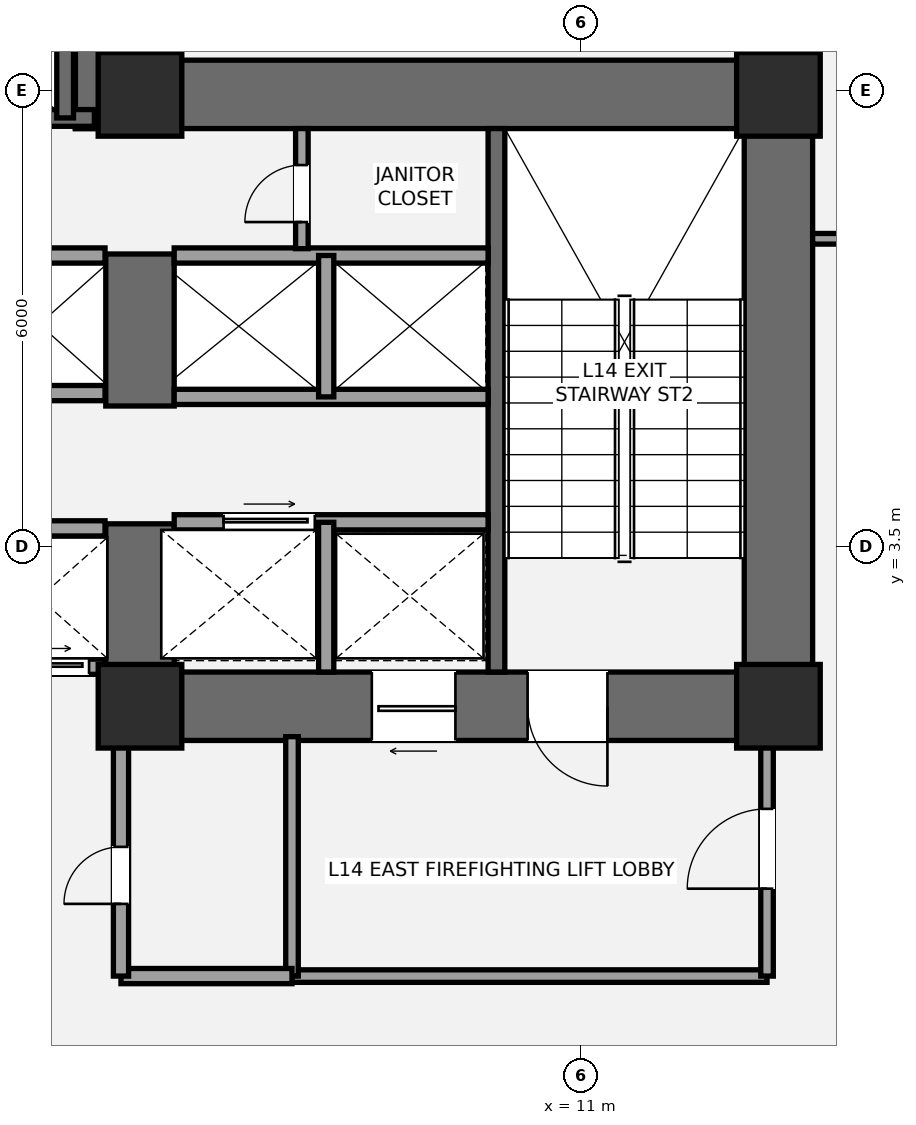
"""IFC4 building model, lengths in metres.
Left out: names, types, materials, properties, quantities, classifications, styles, units other than length and angle.
Written with IfcOpenShell. Run it as: python <this file> out.ifc"""

import sys

from ifc_helpers import new_model, si_unit, direction, frame, frame_2d, origin, origin_2d, place, context, subcontext, project, spatial, rectangle, extrude, element, fill, save


model = new_model("IFC4")
c1 = context("Model", 3, precision=1e-05, world=origin(), true_north=direction((0.0, 1.0)))
c2 = subcontext(c1, "Body", "Model", "MODEL_VIEW")
j1 = project(units=[si_unit("LENGTHUNIT", "METRE"), si_unit("PLANEANGLEUNIT", "RADIAN")], contexts=[c1])
p1 = place(None, origin())
s1 = spatial("IfcSite", under=j1, at=p1, CompositionType="ELEMENT")
p2 = place(p1, origin())
s2 = spatial("IfcBuilding", under=s1, at=p2, CompositionType="ELEMENT")
p3 = place(p2, frame((0.0, 0.0, 55.8)))
s3 = spatial("IfcBuildingStorey", under=s2, at=p3, CompositionType="ELEMENT", Elevation=55.8)
p4 = place(p3, frame((13.6, 0.95, 0.0), z_axis=(0.0, 0.0, 1.0), x_axis=(0.0, 1.0, 0.0)))
e1 = element("IfcWall", 1, at=p4, inside=s3, PredefinedType="SHEAR", context=c2, shape_type="SweptSolid", body=[
    extrude(rectangle(XDim=8.95, YDim=0.9, at=frame_2d((4.475, 0.0))), origin(), (0.0, 0.0, 1.0), 3.6),
])
p5 = place(p3, frame((4.35, 9.45, 0.0), z_axis=(0.0, 0.0, 1.0), x_axis=(1.0, 0.0, 0.0)))
e2 = element("IfcWall", 2, at=p5, inside=s3, PredefinedType="SHEAR", context=c2, shape_type="SweptSolid", body=[
    extrude(rectangle(XDim=9.7, YDim=0.9, at=frame_2d((4.85, 0.0))), origin(), (0.0, 0.0, 1.0), 3.6),
])
p6 = place(p3, frame((14.05, 1.4, 0.0), z_axis=(0.0, 0.0, 1.0), x_axis=(-1.0, 0.0, 0.0)))
e3 = element("IfcWall", 3, at=p6, inside=s3, PredefinedType="SHEAR", context=c2, shape_type="SweptSolid", body=[
    extrude(rectangle(XDim=9.3, YDim=0.9, at=frame_2d((4.65, 0.0))), origin(), (0.0, 0.0, 1.0), 3.6),
])
p7 = place(p6, frame((2.7, 0.0, 0.0)))
e4 = element("IfcOpeningElement", 4, at=p7, cuts=e3, PredefinedType="OPENING", context=c2, shape_type="SweptSolid", body=[
    extrude(rectangle(XDim=1.05, YDim=2.15, at=frame_2d((0.525, 1.075))), frame((0.0, 0.46, 0.0), z_axis=(0.0, -1.0, 0.0), x_axis=(1.0, 0.0, 0.0)), (0.0, 0.0, 1.0), 0.92),
])
p8 = place(p6, frame((4.7, 0.0, 0.0)))
e5 = element("IfcOpeningElement", 5, at=p8, cuts=e3, PredefinedType="OPENING", context=c2, shape_type="SweptSolid", body=[
    extrude(rectangle(XDim=1.1, YDim=2.2, at=frame_2d((0.55, 1.1))), frame((0.0, 0.46, 0.0), z_axis=(0.0, -1.0, 0.0), x_axis=(1.0, 0.0, 0.0)), (0.0, 0.0, 1.0), 0.92),
])
p9 = place(p3, frame((5.2, 0.95, 0.0), z_axis=(0.0, 0.0, 1.0), x_axis=(0.0, 1.0, 0.0)))
e6 = element("IfcWall", 6, at=p9, inside=s3, PredefinedType="SHEAR", context=c2, shape_type="SweptSolid", body=[
    extrude(rectangle(XDim=2.85, YDim=0.9, at=frame_2d((1.425, 0.0))), origin(), (0.0, 0.0, 1.0), 3.6),
])
p10 = place(p3, frame((5.2, 5.35, 0.0), z_axis=(0.0, 0.0, 1.0), x_axis=(0.0, 1.0, 0.0)))
e7 = element("IfcWall", 7, at=p10, inside=s3, PredefinedType="SHEAR", context=c2, shape_type="SweptSolid", body=[
    extrude(rectangle(XDim=2.0, YDim=0.9, at=frame_2d((1.0, 0.0))), origin(), (0.0, 0.0, 1.0), 3.6),
])
p11 = place(p3, frame((9.89, 1.85, 0.0), z_axis=(0.0, 0.0, 1.0), x_axis=(0.0, 1.0, 0.0)))
e8 = element("IfcWall", 8, at=p11, inside=s3, PredefinedType="SHEAR", context=c2, shape_type="SweptSolid", body=[
    extrude(rectangle(XDim=7.15, YDim=0.22, at=frame_2d((3.575, 0.0))), origin(), (0.0, 0.0, 1.0), 3.6),
])
p12 = place(p3, frame((4.8, 9.0, 0.0), z_axis=(0.0, 0.0, 1.0), x_axis=(0.0, 1.0, 0.0)))
e9 = element("IfcWall", 9, at=p12, inside=s3, PredefinedType="SHEAR", context=c2, shape_type="SweptSolid", body=[
    extrude(rectangle(XDim=4.3, YDim=0.9, at=frame_2d((2.15, 0.0))), origin(), (0.0, 0.0, 1.0), 3.6),
])
p13 = place(p3, frame((-4.7, 9.14, 0.0), z_axis=(0.0, 0.0, 1.0), x_axis=(1.0, 0.0, 0.0)))
e10 = element("IfcWall", 10, at=p13, inside=s3, PredefinedType="SHEAR", context=c2, shape_type="SweptSolid", body=[
    extrude(rectangle(XDim=9.3, YDim=0.22, at=frame_2d((4.65, 0.0))), origin(), (0.0, 0.0, 1.0), 3.6),
])
p14 = place(p13, frame((1.15, 0.0, 0.0)))
e11 = element("IfcOpeningElement", 11, at=p14, cuts=e10, PredefinedType="OPENING", context=c2, shape_type="SweptSolid", body=[
    extrude(rectangle(XDim=1.05, YDim=2.15, at=frame_2d((0.525, 1.075))), frame((0.0, 0.12, 0.0), z_axis=(0.0, -1.0, 0.0), x_axis=(1.0, 0.0, 0.0)), (0.0, 0.0, 1.0), 0.24),
])
p15 = place(p3, frame((4.215, 9.14, 0.0), z_axis=(0.0, 0.0, 1.0), x_axis=(0.0, 1.0, 0.0)))
e12 = element("IfcWall", 12, at=p15, inside=s3, PredefinedType="SHEAR", context=c2, shape_type="SweptSolid", body=[
    extrude(rectangle(XDim=3.26, YDim=0.22, at=frame_2d((1.63, 0.0))), origin(), (0.0, 0.0, 1.0), 3.6),
])
for number, where, z_axis, x_axis in (
    (13, (5.2, 1.4, 0.0), (0.0, 0.0, 1.0), (1.0, 0.0, 0.0)),
    (14, (5.2, 9.45, 0.0), (0.0, 0.0, 1.0), (1.0, 0.0, 0.0)),
    (15, (13.6, 1.4, 0.0), (0.0, 0.0, 1.0), (1.0, 0.0, 0.0)),
    (16, (13.6, 9.45, 0.0), (0.0, 0.0, 1.0), (1.0, 0.0, 0.0)),
):
    element("IfcColumn", number, at=place(p3, frame(where, z_axis=z_axis, x_axis=x_axis)), inside=s3, PredefinedType="COLUMN", context=c2, shape_type="SweptSolid", body=[
        extrude(rectangle(XDim=1.1, YDim=1.1, at=origin_2d()), origin(), (0.0, 0.0, 1.0), 3.6),
    ])
p16 = place(p3, frame((7.2, -2.15, 0.0), z_axis=(0.0, 0.0, 1.0), x_axis=(1.0, 0.0, 0.0)))
e17 = element("IfcWall", 17, at=p16, inside=s3, PredefinedType="PARTITIONING", context=c2, shape_type="SweptSolid", body=[
    extrude(rectangle(XDim=6.25, YDim=0.165, at=frame_2d((3.125, 0.0))), origin(), (0.0, 0.0, 1.0), 3.4),
])
p17 = place(p3, frame((7.2, -2.15, 0.0), z_axis=(0.0, 0.0, 1.0), x_axis=(0.0, 1.0, 0.0)))
e18 = element("IfcWall", 18, at=p17, inside=s3, PredefinedType="PARTITIONING", context=c2, shape_type="SweptSolid", body=[
    extrude(rectangle(XDim=3.15, YDim=0.165, at=frame_2d((1.575, 0.0))), origin(), (0.0, 0.0, 1.0), 2.853),
])
p18 = place(p3, frame((13.45, -2.15, 0.0), z_axis=(0.0, 0.0, 1.0), x_axis=(0.0, 1.0, 0.0)))
e19 = element("IfcWall", 19, at=p18, inside=s3, PredefinedType="PARTITIONING", context=c2, shape_type="SweptSolid", body=[
    extrude(rectangle(XDim=3.15, YDim=0.165, at=frame_2d((1.575, 0.0))), origin(), (0.0, 0.0, 1.0), 2.853),
])
p19 = place(p18, frame((1.15, 0.0, 0.0)))
e20 = element("IfcOpeningElement", 20, at=p19, cuts=e19, PredefinedType="OPENING", context=c2, shape_type="SweptSolid", body=[
    extrude(rectangle(XDim=1.05, YDim=2.15, at=frame_2d((0.525, 1.075))), frame((0.0, 0.093, 0.0), z_axis=(0.0, -1.0, 0.0), x_axis=(1.0, 0.0, 0.0)), (0.0, 0.0, 1.0), 0.185),
])
p20 = place(p3, frame((4.95, -2.15, 0.0), z_axis=(0.0, 0.0, 1.0), x_axis=(1.0, 0.0, 0.0)))
e21 = element("IfcWall", 21, at=p20, inside=s3, PredefinedType="SOLIDWALL", context=c2, shape_type="SweptSolid", body=[
    extrude(rectangle(XDim=2.25, YDim=0.2, at=frame_2d((1.125, 0.0))), origin(), (0.0, 0.0, 1.0), 3.4),
])
p21 = place(p3, frame((4.95, -2.15, 0.0), z_axis=(0.0, 0.0, 1.0), x_axis=(0.0, 1.0, 0.0)))
e22 = element("IfcWall", 22, at=p21, inside=s3, PredefinedType="SOLIDWALL", context=c2, shape_type="SweptSolid", body=[
    extrude(rectangle(XDim=3.15, YDim=0.2, at=frame_2d((1.575, 0.0))), origin(), (0.0, 0.0, 1.0), 2.853),
])
p22 = place(p21, frame((0.95, 0.0, 0.0)))
e23 = element("IfcOpeningElement", 23, at=p22, cuts=e22, PredefinedType="OPENING", context=c2, shape_type="SweptSolid", body=[
    extrude(rectangle(XDim=0.75, YDim=2.1, at=frame_2d((0.375, 1.05))), frame((0.0, 0.11, 0.0), z_axis=(0.0, -1.0, 0.0), x_axis=(1.0, 0.0, 0.0)), (0.0, 0.0, 1.0), 0.22),
])
p23 = place(p3, frame((5.65, 3.82, 0.0), z_axis=(0.0, 0.0, 1.0), x_axis=(1.0, 0.0, 0.0)))
e24 = element("IfcWall", 24, at=p23, inside=s3, PredefinedType="SOLIDWALL", context=c2, shape_type="SweptSolid", body=[
    extrude(rectangle(XDim=4.13, YDim=0.2, at=frame_2d((2.065, 0.0))), origin(), (0.0, 0.0, 1.0), 3.4),
])
p24 = place(p23, frame((0.65, 0.0, 0.0)))
e25 = element("IfcOpeningElement", 25, at=p24, cuts=e24, PredefinedType="OPENING", context=c2, shape_type="SweptSolid", body=[
    extrude(rectangle(XDim=1.2, YDim=2.2, at=frame_2d((0.6, 1.1))), frame((0.0, 0.11, 0.0), z_axis=(0.0, -1.0, 0.0), x_axis=(1.0, 0.0, 0.0)), (0.0, 0.0, 1.0), 0.22),
])
p25 = place(p3, frame((7.65, 1.85, 0.0), z_axis=(0.0, 0.0, 1.0), x_axis=(0.0, 1.0, 0.0)))
e26 = element("IfcWall", 26, at=p25, inside=s3, PredefinedType="SOLIDWALL", context=c2, shape_type="SweptSolid", body=[
    extrude(rectangle(XDim=1.97, YDim=0.2, at=frame_2d((0.985, 0.0))), origin(), (0.0, 0.0, 1.0), 3.4),
])
for number, where, z_axis, x_axis in (
    (27, (5.65, 5.47, 0.0), (0.0, 0.0, 1.0), (1.0, 0.0, 0.0)),
    (28, (5.65, 7.33, 0.0), (0.0, 0.0, 1.0), (1.0, 0.0, 0.0)),
):
    element("IfcWall", number, at=place(p3, frame(where, z_axis=z_axis, x_axis=x_axis)), inside=s3, PredefinedType="SOLIDWALL", context=c2, shape_type="SweptSolid", body=[
        extrude(rectangle(XDim=4.13, YDim=0.2, at=frame_2d((2.065, 0.0))), origin(), (0.0, 0.0, 1.0), 3.4),
    ])
p26 = place(p3, frame((7.65, 5.47, 0.0), z_axis=(0.0, 0.0, 1.0), x_axis=(0.0, 1.0, 0.0)))
e29 = element("IfcWall", 29, at=p26, inside=s3, PredefinedType="SOLIDWALL", context=c2, shape_type="SweptSolid", body=[
    extrude(rectangle(XDim=1.86, YDim=0.2, at=frame_2d((0.93, 0.0))), origin(), (0.0, 0.0, 1.0), 3.4),
])
p27 = place(p3, frame((0.88, 1.92, 0.0), z_axis=(0.0, 0.0, 1.0), x_axis=(1.0, 0.0, 0.0)))
e30 = element("IfcWall", 30, at=p27, inside=s3, PredefinedType="SOLIDWALL", context=c2, shape_type="SweptSolid", body=[
    extrude(rectangle(XDim=3.86, YDim=0.2, at=frame_2d((1.93, 0.0))), origin(), (0.0, 0.0, 1.0), 2.39),
])
p28 = place(p27, frame((0.55, 0.0, 0.0)))
e31 = element("IfcOpeningElement", 31, at=p28, cuts=e30, PredefinedType="OPENING", context=c2, shape_type="SweptSolid", body=[
    extrude(rectangle(XDim=1.1, YDim=2.2, at=frame_2d((0.55, 1.1))), frame((0.0, 0.11, 0.0), z_axis=(0.0, -1.0, 0.0), x_axis=(1.0, 0.0, 0.0)), (0.0, 0.0, 1.0), 0.22),
])
p29 = place(p27, frame((2.55, 0.0, 0.0)))
e32 = element("IfcOpeningElement", 32, at=p29, cuts=e30, PredefinedType="OPENING", context=c2, shape_type="SweptSolid", body=[
    extrude(rectangle(XDim=1.1, YDim=2.2, at=frame_2d((0.55, 1.1))), frame((0.0, 0.11, 0.0), z_axis=(0.0, -1.0, 0.0), x_axis=(1.0, 0.0, 0.0)), (0.0, 0.0, 1.0), 0.22),
])
for number, where, z_axis, x_axis in (
    (33, (0.88, 3.74, 0.0), (0.0, 0.0, 1.0), (1.0, 0.0, 0.0)),
    (34, (0.88, 5.52, 0.0), (0.0, 0.0, 1.0), (1.0, 0.0, 0.0)),
    (35, (0.88, 7.33, 0.0), (0.0, 0.0, 1.0), (1.0, 0.0, 0.0)),
):
    element("IfcWall", number, at=place(p3, frame(where, z_axis=z_axis, x_axis=x_axis)), inside=s3, PredefinedType="SOLIDWALL", context=c2, shape_type="SweptSolid", body=[
        extrude(rectangle(XDim=3.86, YDim=0.2, at=frame_2d((1.93, 0.0))), origin(), (0.0, 0.0, 1.0), 3.4),
    ])
p30 = place(p3, frame((7.33, 7.42, 0.0), z_axis=(0.0, 0.0, 1.0), x_axis=(0.0, 1.0, 0.0)))
e36 = element("IfcWall", 36, at=p30, inside=s3, PredefinedType="PARTITIONING", context=c2, shape_type="SweptSolid", body=[
    extrude(rectangle(XDim=1.58, YDim=0.165, at=frame_2d((0.79, 0.0))), origin(), (0.0, 0.0, 1.0), 3.4),
])
p31 = place(p30, frame((0.35, 0.0, 0.0)))
e37 = element("IfcOpeningElement", 37, at=p31, cuts=e36, PredefinedType="OPENING", context=c2, shape_type="SweptSolid", body=[
    extrude(rectangle(XDim=0.75, YDim=2.1, at=frame_2d((0.375, 1.05))), frame((0.0, 0.093, 0.0), z_axis=(0.0, -1.0, 0.0), x_axis=(1.0, 0.0, 0.0)), (0.0, 0.0, 1.0), 0.185),
])
p32 = place(p3, frame((14.05, 7.55, 0.0), z_axis=(0.0, 0.0, 1.0), x_axis=(1.0, 0.0, 0.0)))
e38 = element("IfcWall", 38, at=p32, inside=s3, PredefinedType="PARTITIONING", context=c2, shape_type="SweptSolid", body=[
    extrude(rectangle(XDim=11.634, YDim=0.14, at=frame_2d((5.817, 0.0))), origin(), (0.0, 0.0, 1.0), 2.853),
])
p33 = place(p32, frame((1.2, 0.0, 0.0)))
e39 = element("IfcOpeningElement", 39, at=p33, cuts=e38, PredefinedType="OPENING", context=c2, shape_type="SweptSolid", body=[
    extrude(rectangle(XDim=0.92, YDim=2.15, at=frame_2d((0.46, 1.075))), frame((0.0, 0.08, 0.0), z_axis=(0.0, -1.0, 0.0), x_axis=(1.0, 0.0, 0.0)), (0.0, 0.0, 1.0), 0.16),
])
p34 = place(p7, origin())
e40 = element("IfcDoor", 40, at=p34, inside=s3, OperationType="SINGLE_SWING_LEFT", PredefinedType="DOOR", context=c2, shape_type="SweptSolid", body=[
    extrude(rectangle(XDim=1.05, YDim=2.15, at=frame_2d((0.525, 1.075))), frame((0.0, 0.025, 0.0), z_axis=(0.0, -1.0, 0.0), x_axis=(1.0, 0.0, 0.0)), (0.0, 0.0, 1.0), 0.05),
])
fill(e4, e40)
p35 = place(p19, origin())
e41 = element("IfcDoor", 41, at=p35, inside=s3, OperationType="SINGLE_SWING_LEFT", PredefinedType="DOOR", context=c2, shape_type="SweptSolid", body=[
    extrude(rectangle(XDim=1.05, YDim=2.15, at=frame_2d((0.525, 1.075))), frame((0.0, 0.025, 0.0), z_axis=(0.0, -1.0, 0.0), x_axis=(1.0, 0.0, 0.0)), (0.0, 0.0, 1.0), 0.05),
])
fill(e20, e41)
p36 = place(p22, origin())
e42 = element("IfcDoor", 42, at=p36, inside=s3, OperationType="SINGLE_SWING_LEFT", PredefinedType="DOOR", context=c2, shape_type="SweptSolid", body=[
    extrude(rectangle(XDim=0.75, YDim=2.1, at=frame_2d((0.375, 1.05))), frame((0.0, 0.025, 0.0), z_axis=(0.0, -1.0, 0.0), x_axis=(1.0, 0.0, 0.0)), (0.0, 0.0, 1.0), 0.05),
])
fill(e23, e42)
p37 = place(p8, origin())
e43 = element("IfcDoor", 43, at=p37, inside=s3, OperationType="SLIDING_TO_LEFT", PredefinedType="DOOR", context=c2, shape_type="SweptSolid", body=[
    extrude(rectangle(XDim=1.1, YDim=2.2, at=frame_2d((0.55, 1.1))), frame((0.0, 0.025, 0.0), z_axis=(0.0, -1.0, 0.0), x_axis=(1.0, 0.0, 0.0)), (0.0, 0.0, 1.0), 0.05),
])
fill(e5, e43)
p38 = place(p24, origin())
e44 = element("IfcDoor", 44, at=p38, inside=s3, OperationType="SLIDING_TO_RIGHT", PredefinedType="DOOR", context=c2, shape_type="SweptSolid", body=[
    extrude(rectangle(XDim=1.2, YDim=2.2, at=frame_2d((0.6, 1.1))), frame((0.0, 0.025, 0.0), z_axis=(0.0, -1.0, 0.0), x_axis=(1.0, 0.0, 0.0)), (0.0, 0.0, 1.0), 0.05),
])
fill(e25, e44)
p39 = place(p29, origin())
e45 = element("IfcDoor", 45, at=p39, inside=s3, OperationType="SLIDING_TO_LEFT", PredefinedType="DOOR", context=c2, shape_type="SweptSolid", body=[
    extrude(rectangle(XDim=1.1, YDim=2.2, at=frame_2d((0.55, 1.1))), frame((0.0, 0.025, 0.0), z_axis=(0.0, -1.0, 0.0), x_axis=(1.0, 0.0, 0.0)), (0.0, 0.0, 1.0), 0.05),
])
fill(e32, e45)
p40 = place(p31, origin())
e46 = element("IfcDoor", 46, at=p40, inside=s3, OperationType="SINGLE_SWING_LEFT", PredefinedType="DOOR", context=c2, shape_type="SweptSolid", body=[
    extrude(rectangle(XDim=0.75, YDim=2.1, at=frame_2d((0.375, 1.05))), frame((0.0, 0.025, 0.0), z_axis=(0.0, -1.0, 0.0), x_axis=(1.0, 0.0, 0.0)), (0.0, 0.0, 1.0), 0.05),
])
fill(e37, e46)
save(model, sys.argv[1])
